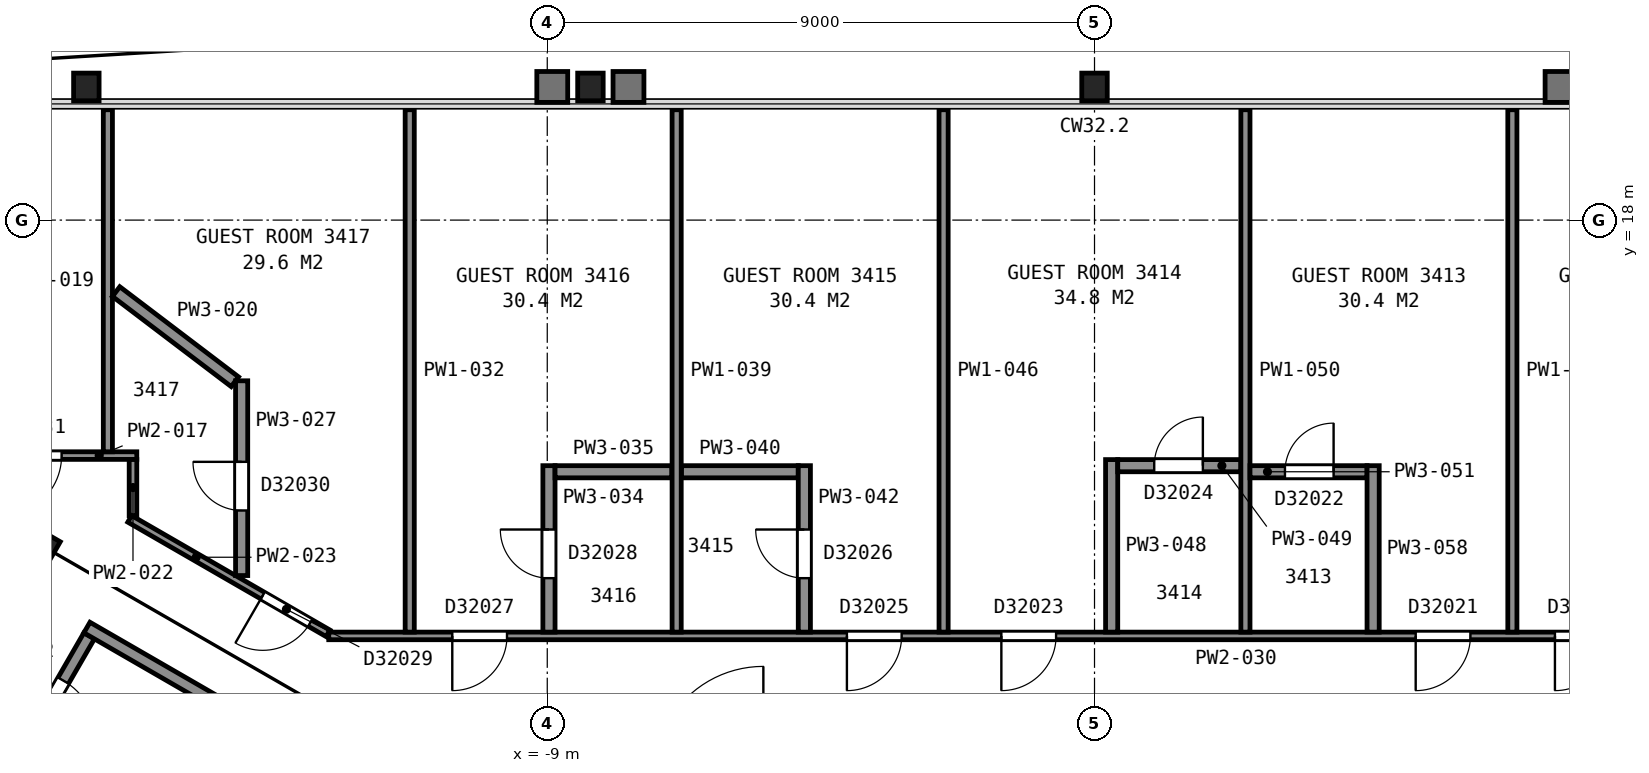
"""IFC4 building model, lengths in metres.
Left out: names, types, materials, properties, quantities, classifications, styles, units other than length and angle.
Written with IfcOpenShell. Run it as: python <this file> out.ifc"""

import sys

from ifc_helpers import new_model, si_unit, direction, frame, frame_2d, origin, origin_2d, place, context, subcontext, project, spatial, rectangle, i_section, extrude, element, fill, save


model = new_model("IFC4")
c1 = context("Model", 3, precision=1e-05, world=origin(), true_north=direction((0.0, 1.0)))
c2 = subcontext(c1, "Body", "Model", "MODEL_VIEW")
j1 = project(units=[si_unit("LENGTHUNIT", "METRE"), si_unit("PLANEANGLEUNIT", "RADIAN")], contexts=[c1])
p1 = place(None, origin())
s1 = spatial("IfcSite", under=j1, at=p1, CompositionType="ELEMENT")
p2 = place(p1, origin())
s2 = spatial("IfcBuilding", under=s1, at=p2, CompositionType="ELEMENT")
p3 = place(p2, frame((0.0, 0.0, 139.6)))
s3 = spatial("IfcBuildingStorey", under=s2, at=p3, CompositionType="ELEMENT", Elevation=139.6)
for number, where, z_axis, x_axis in (
    (1, (0.0, 20.19, 0.0), (0.0, 0.0, 1.0), (1.0, 0.0, 0.0)),
    (2, (-8.29, 20.19, 0.0), (0.0, 0.0, 1.0), (1.0, 0.0, 0.0)),
    (3, (-16.58, 20.19, 0.0), (0.0, 0.0, 1.0), (1.0, 0.0, 0.0)),
):
    element("IfcColumn", number, at=place(p3, frame(where, z_axis=z_axis, x_axis=x_axis)), inside=s3, PredefinedType="COLUMN", context=c2, shape_type="SweptSolid", body=[
        extrude(i_section(OverallWidth=0.419, OverallDepth=0.455, WebThickness=0.042, FlangeThickness=0.068, FilletRadius=0.015, at=origin_2d()), origin(), (0.0, 0.0, 1.0), 2.87),
    ])
p4 = place(p3, frame((-17.3, 12.64, 0.0), z_axis=(0.0, 0.0, 1.0), x_axis=(0.5, 0.866025403784, 0.0)))
e4 = element("IfcColumn", 4, at=p4, inside=s3, PredefinedType="COLUMN", context=c2, shape_type="SweptSolid", body=[
    extrude(i_section(OverallWidth=0.411, OverallDepth=0.434, WebThickness=0.036, FlangeThickness=0.057, FilletRadius=0.015, at=origin_2d()), origin(), (0.0, 0.0, 1.0), 3.545),
])
p5 = place(p3, frame((6.178, 5.299, 0.0), z_axis=(0.0, 0.0, 1.0), x_axis=(0.866026010844, 0.49999894854, 0.0)))
e5 = element("IfcWall", 5, at=p5, inside=s3, PredefinedType="PARTITIONING", context=c2, shape_type="SweptSolid", body=[
    extrude(rectangle(XDim=12.0, YDim=0.2, at=frame_2d((6.0, 0.0))), origin(), (0.0, 0.0, 1.0), 3.35),
])
p6 = place(p3, frame((-16.534, 11.162, 0.0), z_axis=(0.0, 0.0, 1.0), x_axis=(-0.49998411664, -0.866034573852, 0.0)))
e6 = element("IfcWall", 6, at=p6, inside=s3, PredefinedType="PARTITIONING", context=c2, shape_type="SweptSolid", body=[
    extrude(rectangle(XDim=2.8, YDim=0.2, at=frame_2d((1.4, 0.0))), origin(), (0.0, 0.0, 1.0), 3.35),
])
p7 = place(p6, frame((0.85, 0.0, 0.0)))
e7 = element("IfcOpeningElement", 7, at=p7, cuts=e6, PredefinedType="OPENING", context=c2, shape_type="SweptSolid", body=[
    extrude(rectangle(XDim=1.1, YDim=2.1, at=frame_2d((0.55, 1.05))), frame((0.0, 0.11, 0.0), z_axis=(0.0, -1.0, 0.0), x_axis=(1.0, 0.0, 0.0)), (0.0, 0.0, 1.0), 0.22),
])
p8 = place(p3, frame((-6.178, 5.299, 0.0), z_axis=(0.0, 0.0, 1.0), x_axis=(-0.866026010844, 0.49999894854, 0.0)))
e8 = element("IfcWall", 8, at=p8, inside=s3, PredefinedType="PARTITIONING", context=c2, shape_type="SweptSolid", body=[
    extrude(rectangle(XDim=12.0, YDim=0.2, at=frame_2d((6.0, 0.0))), origin(), (0.0, 0.0, 1.0), 3.35),
])
p9 = place(p3, frame((-18.85, 14.127, 0.0), z_axis=(0.0, 0.0, 1.0), x_axis=(1.0, 0.0, 0.0)))
e9 = element("IfcWall", 9, at=p9, inside=s3, PredefinedType="PARTITIONING", context=c2, shape_type="SweptSolid", body=[
    extrude(rectangle(XDim=3.099, YDim=0.125, at=frame_2d((1.55, 0.0))), origin(), (0.0, 0.0, 1.0), 2.262),
])
p10 = place(p9, frame((0.863, 0.0, 0.0)))
e10 = element("IfcOpeningElement", 10, at=p10, cuts=e9, PredefinedType="OPENING", context=c2, shape_type="SweptSolid", body=[
    extrude(rectangle(XDim=1.0, YDim=2.1, at=frame_2d((0.5, 1.05))), frame((0.0, 0.073, 0.0), z_axis=(0.0, -1.0, 0.0), x_axis=(1.0, 0.0, 0.0)), (0.0, 0.0, 1.0), 0.145),
])
p11 = place(p3, frame((-16.226, 14.189, 0.0), z_axis=(0.0, 0.0, 1.0), x_axis=(0.0, 1.0, 0.0)))
e11 = element("IfcWall", 11, at=p11, inside=s3, PredefinedType="PARTITIONING", context=c2, shape_type="SweptSolid", body=[
    extrude(rectangle(XDim=5.625, YDim=0.15, at=frame_2d((2.813, 0.0))), origin(), (0.0, 0.0, 1.0), 2.262),
])
p12 = place(p3, frame((-16.091, 16.824, 0.0), z_axis=(0.0, 0.0, 1.0), x_axis=(0.796497816393, -0.604641404869, 0.0)))
e12 = element("IfcWall", 12, at=p12, inside=s3, PredefinedType="PARTITIONING", context=c2, shape_type="SweptSolid", body=[
    extrude(rectangle(XDim=2.452, YDim=0.2, at=frame_2d((1.226, 0.0))), origin(), (0.0, 0.0, 1.0), 2.262),
])
p13 = place(p3, frame((-15.813, 13.14, 0.0), z_axis=(0.0, 0.0, 1.0), x_axis=(0.0, 1.0, 0.0)))
e13 = element("IfcWall", 13, at=p13, inside=s3, PredefinedType="PARTITIONING", context=c2, shape_type="SweptSolid", body=[
    extrude(rectangle(XDim=0.922, YDim=0.125, at=frame_2d((0.461, 0.0))), origin(), (0.0, 0.0, 1.0), 2.262),
])
p14 = place(p3, frame((-15.867, 13.086, 0.0), z_axis=(0.0, 0.0, 1.0), x_axis=(0.866113281362, -0.499847760672, 0.0)))
e14 = element("IfcWall", 14, at=p14, inside=s3, PredefinedType="PARTITIONING", context=c2, shape_type="SweptSolid", body=[
    extrude(rectangle(XDim=3.767, YDim=0.125, at=frame_2d((1.883, 0.0))), origin(), (0.0, 0.0, 1.0), 2.262),
])
p15 = place(p14, frame((2.525, 0.0, 0.0)))
e15 = element("IfcOpeningElement", 15, at=p15, cuts=e14, PredefinedType="OPENING", context=c2, shape_type="SweptSolid", body=[
    extrude(rectangle(XDim=0.9, YDim=2.1, at=frame_2d((0.45, 1.05))), frame((0.0, 0.073, 0.0), z_axis=(0.0, -1.0, 0.0), x_axis=(1.0, 0.0, 0.0)), (0.0, 0.0, 1.0), 0.145),
])
p16 = place(p3, frame((-14.026, 12.154, 0.0), z_axis=(0.0, 0.0, 1.0), x_axis=(0.0, 1.0, 0.0)))
e16 = element("IfcWall", 16, at=p16, inside=s3, PredefinedType="PARTITIONING", context=c2, shape_type="SweptSolid", body=[
    extrude(rectangle(XDim=3.203, YDim=0.2, at=frame_2d((1.602, 0.0))), origin(), (0.0, 0.0, 1.0), 2.262),
])
p17 = place(p16, frame((1.07, 0.0, 0.0)))
e17 = element("IfcOpeningElement", 17, at=p17, cuts=e16, PredefinedType="OPENING", context=c2, shape_type="SweptSolid", body=[
    extrude(rectangle(XDim=0.8, YDim=2.1, at=frame_2d((0.4, 1.05))), frame((0.0, 0.11, 0.0), z_axis=(0.0, -1.0, 0.0), x_axis=(1.0, 0.0, 0.0)), (0.0, 0.0, 1.0), 0.22),
])
p18 = place(p3, frame((-12.594, 11.161, 0.0), z_axis=(0.0, 0.0, 1.0), x_axis=(1.0, 0.0, 0.0)))
e18 = element("IfcWall", 18, at=p18, inside=s3, PredefinedType="PARTITIONING", context=c2, shape_type="SweptSolid", body=[
    extrude(rectangle(XDim=25.187, YDim=0.125, at=frame_2d((12.594, 0.0))), origin(), (0.0, 0.0, 1.0), 2.262),
])
p19 = place(p18, frame((20.166, 0.0, 0.0)))
e19 = element("IfcOpeningElement", 19, at=p19, cuts=e18, PredefinedType="OPENING", context=c2, shape_type="SweptSolid", body=[
    extrude(rectangle(XDim=0.9, YDim=2.1, at=frame_2d((0.45, 1.05))), frame((0.0, 0.073, 0.0), z_axis=(0.0, -1.0, 0.0), x_axis=(1.0, 0.0, 0.0)), (0.0, 0.0, 1.0), 0.145),
])
p20 = place(p18, frame((17.875, 0.0, 0.0)))
e20 = element("IfcOpeningElement", 20, at=p20, cuts=e18, PredefinedType="OPENING", context=c2, shape_type="SweptSolid", body=[
    extrude(rectangle(XDim=0.9, YDim=2.1, at=frame_2d((0.45, 1.05))), frame((0.0, 0.073, 0.0), z_axis=(0.0, -1.0, 0.0), x_axis=(1.0, 0.0, 0.0)), (0.0, 0.0, 1.0), 0.145),
])
p21 = place(p18, frame((11.062, 0.0, 0.0)))
e21 = element("IfcOpeningElement", 21, at=p21, cuts=e18, PredefinedType="OPENING", context=c2, shape_type="SweptSolid", body=[
    extrude(rectangle(XDim=0.9, YDim=2.1, at=frame_2d((0.45, 1.05))), frame((0.0, 0.073, 0.0), z_axis=(0.0, -1.0, 0.0), x_axis=(1.0, 0.0, 0.0)), (0.0, 0.0, 1.0), 0.145),
])
p22 = place(p18, frame((8.521, 0.0, 0.0)))
e22 = element("IfcOpeningElement", 22, at=p22, cuts=e18, PredefinedType="OPENING", context=c2, shape_type="SweptSolid", body=[
    extrude(rectangle(XDim=0.9, YDim=2.1, at=frame_2d((0.45, 1.05))), frame((0.0, 0.073, 0.0), z_axis=(0.0, -1.0, 0.0), x_axis=(1.0, 0.0, 0.0)), (0.0, 0.0, 1.0), 0.145),
])
p23 = place(p18, frame((2.031, 0.0, 0.0)))
e23 = element("IfcOpeningElement", 23, at=p23, cuts=e18, PredefinedType="OPENING", context=c2, shape_type="SweptSolid", body=[
    extrude(rectangle(XDim=0.9, YDim=2.1, at=frame_2d((0.45, 1.05))), frame((0.0, 0.073, 0.0), z_axis=(0.0, -1.0, 0.0), x_axis=(1.0, 0.0, 0.0)), (0.0, 0.0, 1.0), 0.145),
])
p24 = place(p3, frame((-11.262, 11.223, 0.0), z_axis=(0.0, 0.0, 1.0), x_axis=(0.0, 1.0, 0.0)))
e24 = element("IfcWall", 24, at=p24, inside=s3, PredefinedType="PARTITIONING", context=c2, shape_type="SweptSolid", body=[
    extrude(rectangle(XDim=8.592, YDim=0.15, at=frame_2d((4.296, 0.0))), origin(), (0.0, 0.0, 1.0), 2.262),
])
p25 = place(p3, frame((-8.972, 13.961, 0.0), z_axis=(0.0, 0.0, 1.0), x_axis=(0.0, -1.0, 0.0)))
e25 = element("IfcWall", 25, at=p25, inside=s3, PredefinedType="PARTITIONING", context=c2, shape_type="SweptSolid", body=[
    extrude(rectangle(XDim=2.738, YDim=0.2, at=frame_2d((1.369, 0.0))), origin(), (0.0, 0.0, 1.0), 2.262),
])
p26 = place(p25, frame((1.05, 0.0, 0.0)))
e26 = element("IfcOpeningElement", 26, at=p26, cuts=e25, PredefinedType="OPENING", context=c2, shape_type="SweptSolid", body=[
    extrude(rectangle(XDim=0.8, YDim=2.1, at=frame_2d((0.4, 1.05))), frame((0.0, 0.11, 0.0), z_axis=(0.0, -1.0, 0.0), x_axis=(1.0, 0.0, 0.0)), (0.0, 0.0, 1.0), 0.22),
])
p27 = place(p3, frame((-8.872, 13.861, 0.0), z_axis=(0.0, 0.0, 1.0), x_axis=(1.0, 0.0, 0.0)))
e27 = element("IfcWall", 27, at=p27, inside=s3, PredefinedType="PARTITIONING", context=c2, shape_type="SweptSolid", body=[
    extrude(rectangle(XDim=1.92, YDim=0.2, at=frame_2d((0.96, 0.0))), origin(), (0.0, 0.0, 1.0), 2.262),
])
p28 = place(p3, frame((-6.872, 11.223, 0.0), z_axis=(0.0, 0.0, 1.0), x_axis=(0.0, 1.0, 0.0)))
e28 = element("IfcWall", 28, at=p28, inside=s3, PredefinedType="PARTITIONING", context=c2, shape_type="SweptSolid", body=[
    extrude(rectangle(XDim=8.592, YDim=0.15, at=frame_2d((4.296, 0.0))), origin(), (0.0, 0.0, 1.0), 2.262),
])
p29 = place(p3, frame((-6.792, 13.861, 0.0), z_axis=(0.0, 0.0, 1.0), x_axis=(1.0, 0.0, 0.0)))
e29 = element("IfcWall", 29, at=p29, inside=s3, PredefinedType="PARTITIONING", context=c2, shape_type="SweptSolid", body=[
    extrude(rectangle(XDim=1.92, YDim=0.2, at=frame_2d((0.96, 0.0))), origin(), (0.0, 0.0, 1.0), 2.262),
])
p30 = place(p3, frame((-4.772, 11.223, 0.0), z_axis=(0.0, 0.0, 1.0), x_axis=(0.0, 1.0, 0.0)))
e30 = element("IfcWall", 30, at=p30, inside=s3, PredefinedType="PARTITIONING", context=c2, shape_type="SweptSolid", body=[
    extrude(rectangle(XDim=2.738, YDim=0.2, at=frame_2d((1.369, 0.0))), origin(), (0.0, 0.0, 1.0), 2.262),
])
p31 = place(p30, frame((0.887, 0.0, 0.0)))
e31 = element("IfcOpeningElement", 31, at=p31, cuts=e30, PredefinedType="OPENING", context=c2, shape_type="SweptSolid", body=[
    extrude(rectangle(XDim=0.8, YDim=2.1, at=frame_2d((0.4, 1.05))), frame((0.0, 0.11, 0.0), z_axis=(0.0, -1.0, 0.0), x_axis=(1.0, 0.0, 0.0)), (0.0, 0.0, 1.0), 0.22),
])
p32 = place(p3, frame((-2.482, 11.223, 0.0), z_axis=(0.0, 0.0, 1.0), x_axis=(0.0, 1.0, 0.0)))
e32 = element("IfcWall", 32, at=p32, inside=s3, PredefinedType="PARTITIONING", context=c2, shape_type="SweptSolid", body=[
    extrude(rectangle(XDim=8.592, YDim=0.15, at=frame_2d((4.296, 0.0))), origin(), (0.0, 0.0, 1.0), 2.262),
])
p33 = place(p3, frame((0.282, 11.223, 0.0), z_axis=(0.0, 0.0, 1.0), x_axis=(0.0, 1.0, 0.0)))
e33 = element("IfcWall", 33, at=p33, inside=s3, PredefinedType="PARTITIONING", context=c2, shape_type="SweptSolid", body=[
    extrude(rectangle(XDim=2.838, YDim=0.2, at=frame_2d((1.419, 0.0))), origin(), (0.0, 0.0, 1.0), 2.262),
])
p34 = place(p3, frame((2.407, 13.961, 0.0), z_axis=(0.0, 0.0, 1.0), x_axis=(-1.0, 0.0, 0.0)))
e34 = element("IfcWall", 34, at=p34, inside=s3, PredefinedType="PARTITIONING", context=c2, shape_type="SweptSolid", body=[
    extrude(rectangle(XDim=2.025, YDim=0.2, at=frame_2d((1.012, 0.0))), origin(), (0.0, 0.0, 1.0), 2.262),
])
p35 = place(p34, frame((0.625, 0.0, 0.0)))
e35 = element("IfcOpeningElement", 35, at=p35, cuts=e34, PredefinedType="OPENING", context=c2, shape_type="SweptSolid", body=[
    extrude(rectangle(XDim=0.8, YDim=2.1, at=frame_2d((0.4, 1.05))), frame((0.0, 0.11, 0.0), z_axis=(0.0, -1.0, 0.0), x_axis=(1.0, 0.0, 0.0)), (0.0, 0.0, 1.0), 0.22),
])
p36 = place(p3, frame((2.482, 11.223, 0.0), z_axis=(0.0, 0.0, 1.0), x_axis=(0.0, 1.0, 0.0)))
e36 = element("IfcWall", 36, at=p36, inside=s3, PredefinedType="PARTITIONING", context=c2, shape_type="SweptSolid", body=[
    extrude(rectangle(XDim=8.592, YDim=0.15, at=frame_2d((4.296, 0.0))), origin(), (0.0, 0.0, 1.0), 2.262),
])
p37 = place(p3, frame((4.482, 13.861, 0.0), z_axis=(0.0, 0.0, 1.0), x_axis=(-1.0, 0.0, 0.0)))
e37 = element("IfcWall", 37, at=p37, inside=s3, PredefinedType="PARTITIONING", context=c2, shape_type="SweptSolid", body=[
    extrude(rectangle(XDim=1.925, YDim=0.2, at=frame_2d((0.962, 0.0))), origin(), (0.0, 0.0, 1.0), 2.262),
])
p38 = place(p37, frame((0.55, 0.0, 0.0)))
e38 = element("IfcOpeningElement", 38, at=p38, cuts=e37, PredefinedType="OPENING", context=c2, shape_type="SweptSolid", body=[
    extrude(rectangle(XDim=0.8, YDim=2.1, at=frame_2d((0.4, 1.05))), frame((0.0, 0.11, 0.0), z_axis=(0.0, -1.0, 0.0), x_axis=(1.0, 0.0, 0.0)), (0.0, 0.0, 1.0), 0.22),
])
p39 = place(p3, frame((4.582, 11.223, 0.0), z_axis=(0.0, 0.0, 1.0), x_axis=(0.0, 1.0, 0.0)))
e39 = element("IfcWall", 39, at=p39, inside=s3, PredefinedType="PARTITIONING", context=c2, shape_type="SweptSolid", body=[
    extrude(rectangle(XDim=2.738, YDim=0.2, at=frame_2d((1.369, 0.0))), origin(), (0.0, 0.0, 1.0), 2.262),
])
p40 = place(p3, frame((6.872, 11.223, 0.0), z_axis=(0.0, 0.0, 1.0), x_axis=(0.0, 1.0, 0.0)))
e40 = element("IfcWall", 40, at=p40, inside=s3, PredefinedType="PARTITIONING", context=c2, shape_type="SweptSolid", body=[
    extrude(rectangle(XDim=8.592, YDim=0.15, at=frame_2d((4.296, 0.0))), origin(), (0.0, 0.0, 1.0), 2.262),
])
p41 = place(p7, origin())
e41 = element("IfcDoor", 41, at=p41, inside=s3, OperationType="SINGLE_SWING_RIGHT", PredefinedType="DOOR", context=c2, shape_type="SweptSolid", body=[
    extrude(rectangle(XDim=1.1, YDim=2.1, at=frame_2d((0.55, 1.05))), frame((0.0, 0.025, 0.0), z_axis=(0.0, -1.0, 0.0), x_axis=(1.0, 0.0, 0.0)), (0.0, 0.0, 1.0), 0.05),
])
fill(e7, e41)
p42 = place(p10, origin())
e42 = element("IfcDoor", 42, at=p42, inside=s3, OperationType="SINGLE_SWING_LEFT", PredefinedType="DOOR", context=c2, shape_type="SweptSolid", body=[
    extrude(rectangle(XDim=1.0, YDim=2.1, at=frame_2d((0.5, 1.05))), frame((0.0, 0.025, 0.0), z_axis=(0.0, -1.0, 0.0), x_axis=(1.0, 0.0, 0.0)), (0.0, 0.0, 1.0), 0.05),
])
fill(e10, e42)
p43 = place(p15, origin())
e43 = element("IfcDoor", 43, at=p43, inside=s3, OperationType="SINGLE_SWING_LEFT", PredefinedType="DOOR", context=c2, shape_type="SweptSolid", body=[
    extrude(rectangle(XDim=0.9, YDim=2.1, at=frame_2d((0.45, 1.05))), frame((0.0, 0.025, 0.0), z_axis=(0.0, -1.0, 0.0), x_axis=(1.0, 0.0, 0.0)), (0.0, 0.0, 1.0), 0.05),
])
fill(e15, e43)
p44 = place(p17, origin())
e44 = element("IfcDoor", 44, at=p44, inside=s3, OperationType="SINGLE_SWING_RIGHT", PredefinedType="DOOR", context=c2, shape_type="SweptSolid", body=[
    extrude(rectangle(XDim=0.8, YDim=2.1, at=frame_2d((0.4, 1.05))), frame((0.0, 0.025, 0.0), z_axis=(0.0, -1.0, 0.0), x_axis=(1.0, 0.0, 0.0)), (0.0, 0.0, 1.0), 0.05),
])
fill(e17, e44)
p45 = place(p19, origin())
e45 = element("IfcDoor", 45, at=p45, inside=s3, OperationType="SINGLE_SWING_LEFT", PredefinedType="DOOR", context=c2, shape_type="SweptSolid", body=[
    extrude(rectangle(XDim=0.9, YDim=2.1, at=frame_2d((0.45, 1.05))), frame((0.0, 0.025, 0.0), z_axis=(0.0, -1.0, 0.0), x_axis=(1.0, 0.0, 0.0)), (0.0, 0.0, 1.0), 0.05),
])
fill(e19, e45)
p46 = place(p20, origin())
e46 = element("IfcDoor", 46, at=p46, inside=s3, OperationType="SINGLE_SWING_LEFT", PredefinedType="DOOR", context=c2, shape_type="SweptSolid", body=[
    extrude(rectangle(XDim=0.9, YDim=2.1, at=frame_2d((0.45, 1.05))), frame((0.0, 0.025, 0.0), z_axis=(0.0, -1.0, 0.0), x_axis=(1.0, 0.0, 0.0)), (0.0, 0.0, 1.0), 0.05),
])
fill(e20, e46)
p47 = place(p21, origin())
e47 = element("IfcDoor", 47, at=p47, inside=s3, OperationType="SINGLE_SWING_LEFT", PredefinedType="DOOR", context=c2, shape_type="SweptSolid", body=[
    extrude(rectangle(XDim=0.9, YDim=2.1, at=frame_2d((0.45, 1.05))), frame((0.0, 0.025, 0.0), z_axis=(0.0, -1.0, 0.0), x_axis=(1.0, 0.0, 0.0)), (0.0, 0.0, 1.0), 0.05),
])
fill(e21, e47)
p48 = place(p22, origin())
e48 = element("IfcDoor", 48, at=p48, inside=s3, OperationType="SINGLE_SWING_LEFT", PredefinedType="DOOR", context=c2, shape_type="SweptSolid", body=[
    extrude(rectangle(XDim=0.9, YDim=2.1, at=frame_2d((0.45, 1.05))), frame((0.0, 0.025, 0.0), z_axis=(0.0, -1.0, 0.0), x_axis=(1.0, 0.0, 0.0)), (0.0, 0.0, 1.0), 0.05),
])
fill(e22, e48)
p49 = place(p23, origin())
e49 = element("IfcDoor", 49, at=p49, inside=s3, OperationType="SINGLE_SWING_LEFT", PredefinedType="DOOR", context=c2, shape_type="SweptSolid", body=[
    extrude(rectangle(XDim=0.9, YDim=2.1, at=frame_2d((0.45, 1.05))), frame((0.0, 0.025, 0.0), z_axis=(0.0, -1.0, 0.0), x_axis=(1.0, 0.0, 0.0)), (0.0, 0.0, 1.0), 0.05),
])
fill(e23, e49)
p50 = place(p26, origin())
e50 = element("IfcDoor", 50, at=p50, inside=s3, OperationType="SINGLE_SWING_LEFT", PredefinedType="DOOR", context=c2, shape_type="SweptSolid", body=[
    extrude(rectangle(XDim=0.8, YDim=2.1, at=frame_2d((0.4, 1.05))), frame((0.0, 0.025, 0.0), z_axis=(0.0, -1.0, 0.0), x_axis=(1.0, 0.0, 0.0)), (0.0, 0.0, 1.0), 0.05),
])
fill(e26, e50)
p51 = place(p31, origin())
e51 = element("IfcDoor", 51, at=p51, inside=s3, OperationType="SINGLE_SWING_RIGHT", PredefinedType="DOOR", context=c2, shape_type="SweptSolid", body=[
    extrude(rectangle(XDim=0.8, YDim=2.1, at=frame_2d((0.4, 1.05))), frame((0.0, 0.025, 0.0), z_axis=(0.0, -1.0, 0.0), x_axis=(1.0, 0.0, 0.0)), (0.0, 0.0, 1.0), 0.05),
])
fill(e31, e51)
p52 = place(p35, origin())
e52 = element("IfcDoor", 52, at=p52, inside=s3, OperationType="SINGLE_SWING_LEFT", PredefinedType="DOOR", context=c2, shape_type="SweptSolid", body=[
    extrude(rectangle(XDim=0.8, YDim=2.1, at=frame_2d((0.4, 1.05))), frame((0.0, 0.025, 0.0), z_axis=(0.0, -1.0, 0.0), x_axis=(1.0, 0.0, 0.0)), (0.0, 0.0, 1.0), 0.05),
])
fill(e35, e52)
p53 = place(p38, origin())
e53 = element("IfcDoor", 53, at=p53, inside=s3, OperationType="SINGLE_SWING_LEFT", PredefinedType="DOOR", context=c2, shape_type="SweptSolid", body=[
    extrude(rectangle(XDim=0.8, YDim=2.1, at=frame_2d((0.4, 1.05))), frame((0.0, 0.025, 0.0), z_axis=(0.0, -1.0, 0.0), x_axis=(1.0, 0.0, 0.0)), (0.0, 0.0, 1.0), 0.05),
])
fill(e38, e53)
save(model, sys.argv[1])
